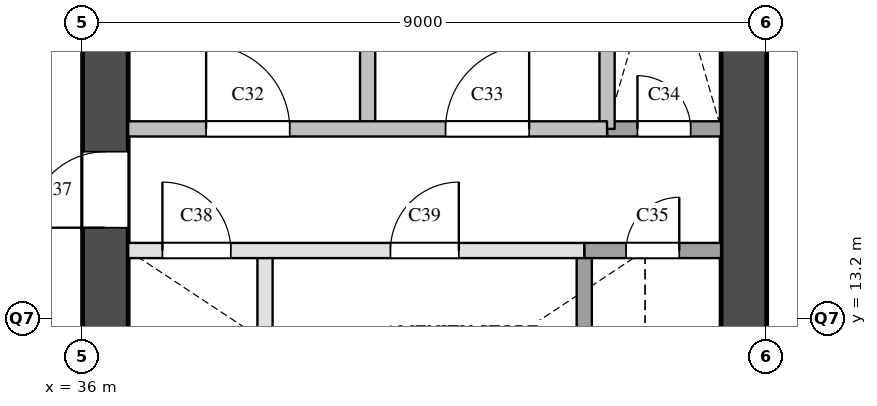
"""IFC4 building model, lengths in metres.
Left out: names, types, materials, properties, quantities, classifications, styles, units other than length and angle.
Written with IfcOpenShell. Run it as: python <this file> out.ifc"""

import sys

from ifc_helpers import new_model, si_unit, direction, frame, frame_2d, origin, place, context, subcontext, project, spatial, rectangle, extrude, element, fill, save


model = new_model("IFC4")
c1 = context("Model", 3, precision=1e-05, world=origin(), true_north=direction((0.0, 1.0)))
c2 = subcontext(c1, "Body", "Model", "MODEL_VIEW")
j1 = project(units=[si_unit("LENGTHUNIT", "METRE"), si_unit("PLANEANGLEUNIT", "RADIAN")], contexts=[c1])
p1 = place(None, origin())
s1 = spatial("IfcSite", under=j1, at=p1, CompositionType="ELEMENT")
p2 = place(p1, origin())
s2 = spatial("IfcBuilding", under=s1, at=p2, CompositionType="ELEMENT")
p3 = place(p2, frame((0.0, 0.0, 53.8)))
s3 = spatial("IfcBuildingStorey", under=s2, at=p3, CompositionType="ELEMENT", Elevation=53.8)
p4 = place(p3, frame((36.3, 9.6, 0.0), z_axis=(0.0, 0.0, 1.0), x_axis=(0.0, 1.0, 0.0)))
e1 = element("IfcWall", 1, at=p4, inside=s3, PredefinedType="SHEAR", context=c2, shape_type="SweptSolid", body=[
    extrude(rectangle(XDim=12.3, YDim=0.6, at=frame_2d((6.15, 0.0))), origin(), (0.0, 0.0, 1.0), 3.5),
])
p5 = place(p4, frame((0.525, 0.0, 0.0)))
e2 = element("IfcOpeningElement", 2, at=p5, cuts=e1, PredefinedType="OPENING", context=c2, shape_type="SweptSolid", body=[
    extrude(rectangle(XDim=1.2, YDim=2.1, at=frame_2d((0.6, 1.05))), frame((0.0, 0.31, 0.0), z_axis=(0.0, -1.0, 0.0), x_axis=(1.0, 0.0, 0.0)), (0.0, 0.0, 1.0), 0.62),
])
p6 = place(p4, frame((4.8, 0.0, 0.0)))
e3 = element("IfcOpeningElement", 3, at=p6, cuts=e1, PredefinedType="OPENING", context=c2, shape_type="SweptSolid", body=[
    extrude(rectangle(XDim=1.0, YDim=2.1, at=frame_2d((0.5, 1.05))), frame((0.0, 0.31, 0.0), z_axis=(0.0, -1.0, 0.0), x_axis=(1.0, 0.0, 0.0)), (0.0, 0.0, 1.0), 0.62),
])
p7 = place(p3, frame((44.7, 9.6, 0.0), z_axis=(0.0, 0.0, 1.0), x_axis=(0.0, 1.0, 0.0)))
e4 = element("IfcWall", 4, at=p7, inside=s3, PredefinedType="SHEAR", context=c2, shape_type="SweptSolid", body=[
    extrude(rectangle(XDim=12.3, YDim=0.6, at=frame_2d((6.15, 0.0))), origin(), (0.0, 0.0, 1.0), 3.5),
])
p8 = place(p7, frame((0.8, 0.0, 0.0)))
e5 = element("IfcOpeningElement", 5, at=p8, cuts=e4, PredefinedType="OPENING", context=c2, shape_type="SweptSolid", body=[
    extrude(rectangle(XDim=0.7, YDim=2.1, at=frame_2d((0.35, 1.05))), frame((0.0, 0.31, 0.0), z_axis=(0.0, -1.0, 0.0), x_axis=(1.0, 0.0, 0.0)), (0.0, 0.0, 1.0), 0.62),
])
p9 = place(p3, frame((38.4, 11.9, 0.0), z_axis=(0.0, 0.0, 1.0), x_axis=(0.0, 1.0, 0.0)))
e6 = element("IfcWall", 6, at=p9, inside=s3, PredefinedType="PARTITIONING", context=c2, shape_type="SweptSolid", body=[
    extrude(rectangle(XDim=2.2, YDim=0.2, at=frame_2d((1.1, 0.0))), origin(), (0.0, 0.0, 1.0), 3.5),
])
p10 = place(p3, frame((39.75, 15.7, 0.0), z_axis=(0.0, 0.0, 1.0), x_axis=(0.0, 1.0, 0.0)))
e7 = element("IfcWall", 7, at=p10, inside=s3, PredefinedType="SOLIDWALL", context=c2, shape_type="SweptSolid", body=[
    extrude(rectangle(XDim=4.3, YDim=0.2, at=frame_2d((2.15, 0.0))), origin(), (0.0, 0.0, 1.0), 3.5),
])
p11 = place(p3, frame((42.6, 11.9, 0.0), z_axis=(0.0, 0.0, 1.0), x_axis=(0.0, 1.0, 0.0)))
e8 = element("IfcWall", 8, at=p11, inside=s3, PredefinedType="SOLIDWALL", context=c2, shape_type="SweptSolid", body=[
    extrude(rectangle(XDim=2.2, YDim=0.2, at=frame_2d((1.1, 0.0))), origin(), (0.0, 0.0, 1.0), 3.5),
])
p12 = place(p3, frame((42.9, 15.7, 0.0), z_axis=(0.0, 0.0, 1.0), x_axis=(0.0, 1.0, 0.0)))
e9 = element("IfcWall", 9, at=p12, inside=s3, PredefinedType="SOLIDWALL", context=c2, shape_type="SweptSolid", body=[
    extrude(rectangle(XDim=4.3, YDim=0.2, at=frame_2d((2.15, 0.0))), origin(), (0.0, 0.0, 1.0), 3.5),
])
p13 = place(p3, frame((36.6, 14.1, 0.0), z_axis=(0.0, 0.0, 1.0), x_axis=(1.0, 0.0, 0.0)))
e10 = element("IfcWall", 10, at=p13, inside=s3, PredefinedType="PARTITIONING", context=c2, shape_type="SweptSolid", body=[
    extrude(rectangle(XDim=6.0, YDim=0.2, at=frame_2d((3.0, 0.0))), origin(), (0.0, 0.0, 1.0), 3.5),
])
p14 = place(p13, frame((0.45, 0.0, 0.0)))
e11 = element("IfcOpeningElement", 11, at=p14, cuts=e10, PredefinedType="OPENING", context=c2, shape_type="SweptSolid", body=[
    extrude(rectangle(XDim=0.9, YDim=2.1, at=frame_2d((0.45, 1.05))), frame((0.0, 0.11, 0.0), z_axis=(0.0, -1.0, 0.0), x_axis=(1.0, 0.0, 0.0)), (0.0, 0.0, 1.0), 0.22),
])
p15 = place(p13, frame((3.45, 0.0, 0.0)))
e12 = element("IfcOpeningElement", 12, at=p15, cuts=e10, PredefinedType="OPENING", context=c2, shape_type="SweptSolid", body=[
    extrude(rectangle(XDim=0.9, YDim=2.1, at=frame_2d((0.45, 1.05))), frame((0.0, 0.11, 0.0), z_axis=(0.0, -1.0, 0.0), x_axis=(1.0, 0.0, 0.0)), (0.0, 0.0, 1.0), 0.22),
])
p16 = place(p3, frame((42.6, 14.1, 0.0), z_axis=(0.0, 0.0, 1.0), x_axis=(1.0, 0.0, 0.0)))
e13 = element("IfcWall", 13, at=p16, inside=s3, PredefinedType="SOLIDWALL", context=c2, shape_type="SweptSolid", body=[
    extrude(rectangle(XDim=1.8, YDim=0.2, at=frame_2d((0.9, 0.0))), origin(), (0.0, 0.0, 1.0), 3.5),
])
p17 = place(p16, frame((0.55, 0.0, 0.0)))
e14 = element("IfcOpeningElement", 14, at=p17, cuts=e13, PredefinedType="OPENING", context=c2, shape_type="SweptSolid", body=[
    extrude(rectangle(XDim=0.7, YDim=2.1, at=frame_2d((0.35, 1.05))), frame((0.0, 0.11, 0.0), z_axis=(0.0, -1.0, 0.0), x_axis=(1.0, 0.0, 0.0)), (0.0, 0.0, 1.0), 0.22),
])
p18 = place(p3, frame((42.9, 15.7, 0.0), z_axis=(0.0, 0.0, 1.0), x_axis=(1.0, 0.0, 0.0)))
e15 = element("IfcWall", 15, at=p18, inside=s3, PredefinedType="SOLIDWALL", context=c2, shape_type="SweptSolid", body=[
    extrude(rectangle(XDim=1.5, YDim=0.2, at=frame_2d((0.75, 0.0))), origin(), (0.0, 0.0, 1.0), 3.5),
])
p19 = place(p18, frame((0.4, 0.0, 0.0)))
e16 = element("IfcOpeningElement", 16, at=p19, cuts=e15, PredefinedType="OPENING", context=c2, shape_type="SweptSolid", body=[
    extrude(rectangle(XDim=0.7, YDim=2.1, at=frame_2d((0.35, 1.05))), frame((0.0, 0.11, 0.0), z_axis=(0.0, -1.0, 0.0), x_axis=(1.0, 0.0, 0.0)), (0.0, 0.0, 1.0), 0.22),
])
p20 = place(p3, frame((36.6, 15.7, 0.0), z_axis=(0.0, 0.0, 1.0), x_axis=(1.0, 0.0, 0.0)))
e17 = element("IfcWall", 17, at=p20, inside=s3, PredefinedType="SOLIDWALL", context=c2, shape_type="SweptSolid", body=[
    extrude(rectangle(XDim=6.3, YDim=0.2, at=frame_2d((3.15, 0.0))), origin(), (0.0, 0.0, 1.0), 3.5),
])
p21 = place(p20, frame((1.025, 0.0, 0.0)))
e18 = element("IfcOpeningElement", 18, at=p21, cuts=e17, PredefinedType="OPENING", context=c2, shape_type="SweptSolid", body=[
    extrude(rectangle(XDim=1.1, YDim=2.1, at=frame_2d((0.55, 1.05))), frame((0.0, 0.11, 0.0), z_axis=(0.0, -1.0, 0.0), x_axis=(1.0, 0.0, 0.0)), (0.0, 0.0, 1.0), 0.22),
])
p22 = place(p20, frame((4.175, 0.0, 0.0)))
e19 = element("IfcOpeningElement", 19, at=p22, cuts=e17, PredefinedType="OPENING", context=c2, shape_type="SweptSolid", body=[
    extrude(rectangle(XDim=1.1, YDim=2.1, at=frame_2d((0.55, 1.05))), frame((0.0, 0.11, 0.0), z_axis=(0.0, -1.0, 0.0), x_axis=(1.0, 0.0, 0.0)), (0.0, 0.0, 1.0), 0.22),
])
p23 = place(p21, origin())
e20 = element("IfcDoor", 20, at=p23, inside=s3, OperationType="SINGLE_SWING_LEFT", PredefinedType="DOOR", context=c2, shape_type="SweptSolid", body=[
    extrude(rectangle(XDim=1.1, YDim=2.1, at=frame_2d((0.55, 1.05))), frame((0.0, 0.025, 0.0), z_axis=(0.0, -1.0, 0.0), x_axis=(1.0, 0.0, 0.0)), (0.0, 0.0, 1.0), 0.05),
])
fill(e18, e20)
p24 = place(p22, origin())
e21 = element("IfcDoor", 21, at=p24, inside=s3, OperationType="SINGLE_SWING_RIGHT", PredefinedType="DOOR", context=c2, shape_type="SweptSolid", body=[
    extrude(rectangle(XDim=1.1, YDim=2.1, at=frame_2d((0.55, 1.05))), frame((0.0, 0.025, 0.0), z_axis=(0.0, -1.0, 0.0), x_axis=(1.0, 0.0, 0.0)), (0.0, 0.0, 1.0), 0.05),
])
fill(e19, e21)
p25 = place(p19, origin())
e22 = element("IfcDoor", 22, at=p25, inside=s3, OperationType="SINGLE_SWING_LEFT", PredefinedType="DOOR", context=c2, shape_type="SweptSolid", body=[
    extrude(rectangle(XDim=0.7, YDim=2.1, at=frame_2d((0.35, 1.05))), frame((0.0, 0.025, 0.0), z_axis=(0.0, -1.0, 0.0), x_axis=(1.0, 0.0, 0.0)), (0.0, 0.0, 1.0), 0.05),
])
fill(e16, e22)
p26 = place(p17, origin())
e23 = element("IfcDoor", 23, at=p26, inside=s3, OperationType="SINGLE_SWING_RIGHT", PredefinedType="DOOR", context=c2, shape_type="SweptSolid", body=[
    extrude(rectangle(XDim=0.7, YDim=2.1, at=frame_2d((0.35, 1.05))), frame((0.0, 0.025, 0.0), z_axis=(0.0, -1.0, 0.0), x_axis=(1.0, 0.0, 0.0)), (0.0, 0.0, 1.0), 0.05),
])
fill(e14, e23)
p27 = place(p6, origin())
e24 = element("IfcDoor", 24, at=p27, inside=s3, OperationType="SINGLE_SWING_LEFT", PredefinedType="DOOR", context=c2, shape_type="SweptSolid", body=[
    extrude(rectangle(XDim=1.0, YDim=2.1, at=frame_2d((0.5, 1.05))), frame((0.0, 0.025, 0.0), z_axis=(0.0, -1.0, 0.0), x_axis=(1.0, 0.0, 0.0)), (0.0, 0.0, 1.0), 0.05),
])
fill(e3, e24)
p28 = place(p14, origin())
e25 = element("IfcDoor", 25, at=p28, inside=s3, OperationType="SINGLE_SWING_LEFT", PredefinedType="DOOR", context=c2, shape_type="SweptSolid", body=[
    extrude(rectangle(XDim=0.9, YDim=2.1, at=frame_2d((0.45, 1.05))), frame((0.0, 0.025, 0.0), z_axis=(0.0, -1.0, 0.0), x_axis=(1.0, 0.0, 0.0)), (0.0, 0.0, 1.0), 0.05),
])
fill(e11, e25)
p29 = place(p15, origin())
e26 = element("IfcDoor", 26, at=p29, inside=s3, OperationType="SINGLE_SWING_RIGHT", PredefinedType="DOOR", context=c2, shape_type="SweptSolid", body=[
    extrude(rectangle(XDim=0.9, YDim=2.1, at=frame_2d((0.45, 1.05))), frame((0.0, 0.025, 0.0), z_axis=(0.0, -1.0, 0.0), x_axis=(1.0, 0.0, 0.0)), (0.0, 0.0, 1.0), 0.05),
])
fill(e12, e26)
save(model, sys.argv[1])
